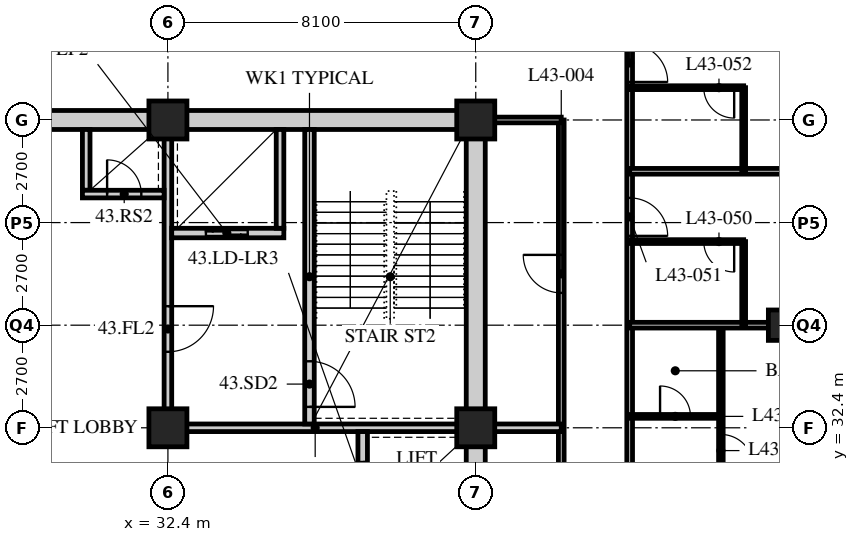
"""IFC4 building model, lengths in metres.
Left out: names, types, materials, properties, quantities, classifications, styles, units other than length and angle.
Written with IfcOpenShell. Run it as: python <this file> out.ifc"""

import sys

from ifc_helpers import new_model, si_unit, direction, frame, frame_2d, origin, origin_2d, place, context, subcontext, project, spatial, rectangle, hollow_rectangle, extrude, element, fill, save


model = new_model("IFC4")
c1 = context("Model", 3, precision=1e-05, world=origin(), true_north=direction((0.0, 1.0)))
c2 = subcontext(c1, "Body", "Model", "MODEL_VIEW")
j1 = project(units=[si_unit("LENGTHUNIT", "METRE"), si_unit("PLANEANGLEUNIT", "RADIAN")], contexts=[c1])
p1 = place(None, origin())
s1 = spatial("IfcSite", under=j1, at=p1, CompositionType="ELEMENT")
p2 = place(p1, origin())
s2 = spatial("IfcBuilding", under=s1, at=p2, CompositionType="ELEMENT")
p3 = place(p2, frame((0.0, 0.0, 170.4)))
s3 = spatial("IfcBuildingStorey", under=s2, at=p3, CompositionType="ELEMENT", Elevation=170.4)
for number, where, z_axis, x_axis in (
    (1, (32.4, 32.4, 0.0), (0.0, 0.0, 1.0), (1.0, 0.0, 0.0)),
    (2, (32.4, 40.5, 0.0), (0.0, 0.0, 1.0), (1.0, 0.0, 0.0)),
    (3, (40.5, 32.4, 0.0), (0.0, 0.0, 1.0), (1.0, 0.0, 0.0)),
    (4, (40.5, 40.5, 0.0), (0.0, 0.0, 1.0), (1.0, 0.0, 0.0)),
):
    element("IfcColumn", number, at=place(p3, frame(where, z_axis=z_axis, x_axis=x_axis)), inside=s3, PredefinedType="COLUMN", context=c2, shape_type="SweptSolid", body=[
        extrude(hollow_rectangle(XDim=1.0, YDim=1.0, WallThickness=0.1, at=origin_2d()), origin(), (0.0, 0.0, 1.0), 3.6),
    ])
p4 = place(p3, frame((48.6, 35.1, 0.0), z_axis=(0.0, 0.0, 1.0), x_axis=(1.0, 0.0, 0.0)))
e5 = element("IfcColumn", 5, at=p4, inside=s3, PredefinedType="COLUMN", context=c2, shape_type="SweptSolid", body=[
    extrude(hollow_rectangle(XDim=0.8, YDim=0.8, WallThickness=0.08, at=origin_2d()), origin(), (0.0, 0.0, 1.0), 3.6),
])
p5 = place(p3, frame((44.55, 18.9, 0.0), z_axis=(0.0, 0.0, 1.0), x_axis=(0.0, 1.0, 0.0)))
e6 = element("IfcWall", 6, at=p5, inside=s3, PredefinedType="PARTITIONING", context=c2, shape_type="SweptSolid", body=[
    extrude(rectangle(XDim=24.3, YDim=0.15, at=frame_2d((12.15, 0.0))), origin(), (0.0, 0.0, 1.0), 3.39),
])
p6 = place(p5, frame((2.35, 0.0, 0.0)))
e7 = element("IfcOpeningElement", 7, at=p6, cuts=e6, PredefinedType="OPENING", context=c2, shape_type="SweptSolid", body=[
    extrude(rectangle(XDim=1.0, YDim=2.1, at=frame_2d((0.5, 1.05))), frame((0.0, 0.085, 0.0), z_axis=(0.0, -1.0, 0.0), x_axis=(1.0, 0.0, 0.0)), (0.0, 0.0, 1.0), 0.17),
])
p7 = place(p5, frame((4.45, 0.0, 0.0)))
e8 = element("IfcOpeningElement", 8, at=p7, cuts=e6, PredefinedType="OPENING", context=c2, shape_type="SweptSolid", body=[
    extrude(rectangle(XDim=1.0, YDim=2.1, at=frame_2d((0.5, 1.05))), frame((0.0, 0.085, 0.0), z_axis=(0.0, -1.0, 0.0), x_axis=(1.0, 0.0, 0.0)), (0.0, 0.0, 1.0), 0.17),
])
p8 = place(p5, frame((18.55, 0.0, 0.0)))
e9 = element("IfcOpeningElement", 9, at=p8, cuts=e6, PredefinedType="OPENING", context=c2, shape_type="SweptSolid", body=[
    extrude(rectangle(XDim=1.0, YDim=2.1, at=frame_2d((0.5, 1.05))), frame((0.0, 0.085, 0.0), z_axis=(0.0, -1.0, 0.0), x_axis=(1.0, 0.0, 0.0)), (0.0, 0.0, 1.0), 0.17),
])
p9 = place(p5, frame((22.6, 0.0, 0.0)))
e10 = element("IfcOpeningElement", 10, at=p9, cuts=e6, PredefinedType="OPENING", context=c2, shape_type="SweptSolid", body=[
    extrude(rectangle(XDim=1.0, YDim=2.1, at=frame_2d((0.5, 1.05))), frame((0.0, 0.085, 0.0), z_axis=(0.0, -1.0, 0.0), x_axis=(1.0, 0.0, 0.0)), (0.0, 0.0, 1.0), 0.17),
])
p10 = place(p3, frame((42.75, 20.7, 0.0), z_axis=(0.0, 0.0, 1.0), x_axis=(0.0, 1.0, 0.0)))
e11 = element("IfcWall", 11, at=p10, inside=s3, PredefinedType="PARTITIONING", context=c2, shape_type="SweptSolid", body=[
    extrude(rectangle(XDim=19.8, YDim=0.15, at=frame_2d((9.9, 0.0))), origin(), (0.0, 0.0, 1.0), 3.39),
])
p11 = place(p10, frame((7.15, 0.0, 0.0)))
e12 = element("IfcOpeningElement", 12, at=p11, cuts=e11, PredefinedType="OPENING", context=c2, shape_type="SweptSolid", body=[
    extrude(rectangle(XDim=1.0, YDim=2.1, at=frame_2d((0.5, 1.05))), frame((0.0, 0.085, 0.0), z_axis=(0.0, -1.0, 0.0), x_axis=(1.0, 0.0, 0.0)), (0.0, 0.0, 1.0), 0.17),
])
p12 = place(p10, frame((15.25, 0.0, 0.0)))
e13 = element("IfcOpeningElement", 13, at=p12, cuts=e11, PredefinedType="OPENING", context=c2, shape_type="SweptSolid", body=[
    extrude(rectangle(XDim=1.0, YDim=2.1, at=frame_2d((0.5, 1.05))), frame((0.0, 0.085, 0.0), z_axis=(0.0, -1.0, 0.0), x_axis=(1.0, 0.0, 0.0)), (0.0, 0.0, 1.0), 0.17),
])
p13 = place(p3, frame((42.75, 40.5, 0.0), z_axis=(0.0, 0.0, 1.0), x_axis=(-1.0, 0.0, 0.0)))
e14 = element("IfcWall", 14, at=p13, inside=s3, PredefinedType="PARTITIONING", context=c2, shape_type="SweptSolid", body=[
    extrude(rectangle(XDim=2.05, YDim=0.15, at=frame_2d((1.025, 0.0))), origin(), (0.0, 0.0, 1.0), 3.39),
])
p14 = place(p3, frame((40.5, 32.4, 0.0), z_axis=(0.0, 0.0, 1.0), x_axis=(1.0, 0.0, 0.0)))
e15 = element("IfcWall", 15, at=p14, inside=s3, PredefinedType="SOLIDWALL", context=c2, shape_type="SweptSolid", body=[
    extrude(rectangle(XDim=2.25, YDim=0.2, at=frame_2d((1.125, 0.0))), origin(), (0.0, 0.0, 1.0), 3.39),
])
p15 = place(p3, frame((46.95, 22.95, 0.0), z_axis=(0.0, 0.0, 1.0), x_axis=(0.0, 1.0, 0.0)))
e16 = element("IfcWall", 16, at=p15, inside=s3, PredefinedType="PARTITIONING", context=c2, shape_type="SweptSolid", body=[
    extrude(rectangle(XDim=12.15, YDim=0.12, at=frame_2d((6.075, 0.0))), origin(), (0.0, 0.0, 1.0), 3.39),
])
p16 = place(p15, frame((0.975, 0.0, 0.0)))
e17 = element("IfcOpeningElement", 17, at=p16, cuts=e16, PredefinedType="OPENING", context=c2, shape_type="SweptSolid", body=[
    extrude(rectangle(XDim=0.85, YDim=2.1, at=frame_2d((0.425, 1.05))), frame((0.0, 0.07, 0.0), z_axis=(0.0, -1.0, 0.0), x_axis=(1.0, 0.0, 0.0)), (0.0, 0.0, 1.0), 0.14),
])
p17 = place(p15, frame((8.425, 0.0, 0.0)))
e18 = element("IfcOpeningElement", 18, at=p17, cuts=e16, PredefinedType="OPENING", context=c2, shape_type="SweptSolid", body=[
    extrude(rectangle(XDim=0.85, YDim=2.1, at=frame_2d((0.425, 1.05))), frame((0.0, 0.07, 0.0), z_axis=(0.0, -1.0, 0.0), x_axis=(1.0, 0.0, 0.0)), (0.0, 0.0, 1.0), 0.14),
])
p18 = place(p3, frame((44.55, 32.7, 0.0), z_axis=(0.0, 0.0, 1.0), x_axis=(1.0, 0.0, 0.0)))
e19 = element("IfcWall", 19, at=p18, inside=s3, PredefinedType="PARTITIONING", context=c2, shape_type="SweptSolid", body=[
    extrude(rectangle(XDim=2.4, YDim=0.1, at=frame_2d((1.2, 0.0))), origin(), (0.0, 0.0, 1.0), 3.39),
])
p19 = place(p18, frame((0.8, 0.0, 0.0)))
e20 = element("IfcOpeningElement", 20, at=p19, cuts=e19, PredefinedType="OPENING", context=c2, shape_type="SweptSolid", body=[
    extrude(rectangle(XDim=0.8, YDim=2.1, at=frame_2d((0.4, 1.05))), frame((0.0, 0.06, 0.0), z_axis=(0.0, -1.0, 0.0), x_axis=(1.0, 0.0, 0.0)), (0.0, 0.0, 1.0), 0.12),
])
p20 = place(p3, frame((44.55, 35.1, 0.0), z_axis=(0.0, 0.0, 1.0), x_axis=(1.0, 0.0, 0.0)))
e21 = element("IfcWall", 21, at=p20, inside=s3, PredefinedType="PARTITIONING", context=c2, shape_type="SweptSolid", body=[
    extrude(rectangle(XDim=11.85, YDim=0.15, at=frame_2d((5.925, 0.0))), origin(), (0.0, 0.0, 1.0), 2.778),
])
p21 = place(p3, frame((47.55, 35.1, 0.0), z_axis=(0.0, 0.0, 1.0), x_axis=(0.0, 1.0, 0.0)))
e22 = element("IfcWall", 22, at=p21, inside=s3, PredefinedType="PARTITIONING", context=c2, shape_type="SweptSolid", body=[
    extrude(rectangle(XDim=2.2, YDim=0.1, at=frame_2d((1.1, 0.0))), origin(), (0.0, 0.0, 1.0), 3.39),
])
p22 = place(p3, frame((44.55, 37.3, 0.0), z_axis=(0.0, 0.0, 1.0), x_axis=(1.0, 0.0, 0.0)))
e23 = element("IfcWall", 23, at=p22, inside=s3, PredefinedType="PARTITIONING", context=c2, shape_type="SweptSolid", body=[
    extrude(rectangle(XDim=3.0, YDim=0.1, at=frame_2d((1.5, 0.0))), origin(), (0.0, 0.0, 1.0), 3.39),
])
p23 = place(p22, frame((1.95, 0.0, 0.0)))
e24 = element("IfcOpeningElement", 24, at=p23, cuts=e23, PredefinedType="OPENING", context=c2, shape_type="SweptSolid", body=[
    extrude(rectangle(XDim=0.8, YDim=2.1, at=frame_2d((0.4, 1.05))), frame((0.0, 0.06, 0.0), z_axis=(0.0, -1.0, 0.0), x_axis=(1.0, 0.0, 0.0)), (0.0, 0.0, 1.0), 0.12),
])
p24 = place(p3, frame((44.55, 39.15, 0.0), z_axis=(0.0, 0.0, 1.0), x_axis=(1.0, 0.0, 0.0)))
e25 = element("IfcWall", 25, at=p24, inside=s3, PredefinedType="PARTITIONING", context=c2, shape_type="SweptSolid", body=[
    extrude(rectangle(XDim=11.85, YDim=0.15, at=frame_2d((5.925, 0.0))), origin(), (0.0, 0.0, 1.0), 3.39),
])
p25 = place(p3, frame((47.55, 39.15, 0.0), z_axis=(0.0, 0.0, 1.0), x_axis=(0.0, 1.0, 0.0)))
e26 = element("IfcWall", 26, at=p25, inside=s3, PredefinedType="PARTITIONING", context=c2, shape_type="SweptSolid", body=[
    extrude(rectangle(XDim=2.2, YDim=0.1, at=frame_2d((1.1, 0.0))), origin(), (0.0, 0.0, 1.0), 3.39),
])
p26 = place(p3, frame((44.55, 41.35, 0.0), z_axis=(0.0, 0.0, 1.0), x_axis=(1.0, 0.0, 0.0)))
e27 = element("IfcWall", 27, at=p26, inside=s3, PredefinedType="PARTITIONING", context=c2, shape_type="SweptSolid", body=[
    extrude(rectangle(XDim=3.0, YDim=0.1, at=frame_2d((1.5, 0.0))), origin(), (0.0, 0.0, 1.0), 3.39),
])
p27 = place(p26, frame((1.95, 0.0, 0.0)))
e28 = element("IfcOpeningElement", 28, at=p27, cuts=e27, PredefinedType="OPENING", context=c2, shape_type="SweptSolid", body=[
    extrude(rectangle(XDim=0.8, YDim=2.1, at=frame_2d((0.4, 1.05))), frame((0.0, 0.06, 0.0), z_axis=(0.0, -1.0, 0.0), x_axis=(1.0, 0.0, 0.0)), (0.0, 0.0, 1.0), 0.12),
])
p28 = place(p3, frame((15.95, 40.5, 0.0), z_axis=(0.0, 0.0, 1.0), x_axis=(1.0, 0.0, 0.0)))
e29 = element("IfcWall", 29, at=p28, inside=s3, PredefinedType="SOLIDWALL", context=c2, shape_type="SweptSolid", body=[
    extrude(rectangle(XDim=24.8, YDim=0.5, at=frame_2d((12.4, 0.0))), origin(), (0.0, 0.0, 1.0), 2.74),
])
p29 = place(p28, frame((11.5, 0.0, 0.0)))
e30 = element("IfcOpeningElement", 30, at=p29, cuts=e29, PredefinedType="OPENING", context=c2, shape_type="SweptSolid", body=[
    extrude(rectangle(XDim=1.8, YDim=2.4, at=frame_2d((0.9, 1.2))), frame((0.0, 0.26, 0.0), z_axis=(0.0, -1.0, 0.0), x_axis=(1.0, 0.0, 0.0)), (0.0, 0.0, 1.0), 0.52),
])
p30 = place(p3, frame((40.5, 24.55, 0.0), z_axis=(0.0, 0.0, 1.0), x_axis=(0.0, 1.0, 0.0)))
e31 = element("IfcWall", 31, at=p30, inside=s3, PredefinedType="SOLIDWALL", context=c2, shape_type="SweptSolid", body=[
    extrude(rectangle(XDim=15.7, YDim=0.5, at=frame_2d((7.85, 0.0))), origin(), (0.0, 0.0, 1.0), 2.778),
])
p31 = place(p3, frame((32.3, 32.4, 0.0), z_axis=(0.0, 0.0, 1.0), x_axis=(1.0, 0.0, 0.0)))
e32 = element("IfcWall", 32, at=p31, inside=s3, PredefinedType="SOLIDWALL", context=c2, shape_type="SweptSolid", body=[
    extrude(rectangle(XDim=7.95, YDim=0.2, at=frame_2d((3.975, 0.0))), origin(), (0.0, 0.0, 1.0), 2.778),
])
p32 = place(p3, frame((32.4, 32.5, 0.0), z_axis=(0.0, 0.0, 1.0), x_axis=(0.0, 1.0, 0.0)))
e33 = element("IfcWall", 33, at=p32, inside=s3, PredefinedType="SOLIDWALL", context=c2, shape_type="SweptSolid", body=[
    extrude(rectangle(XDim=7.75, YDim=0.2, at=frame_2d((3.875, 0.0))), origin(), (0.0, 0.0, 1.0), 2.778),
])
p33 = place(p32, frame((1.9, 0.0, 0.0)))
e34 = element("IfcOpeningElement", 34, at=p33, cuts=e33, PredefinedType="OPENING", context=c2, shape_type="SweptSolid", body=[
    extrude(rectangle(XDim=1.2, YDim=2.1, at=frame_2d((0.6, 1.05))), frame((0.0, 0.11, 0.0), z_axis=(0.0, -1.0, 0.0), x_axis=(1.0, 0.0, 0.0)), (0.0, 0.0, 1.0), 0.22),
])
p34 = place(p3, frame((37.525, 24.55, 0.0), z_axis=(0.0, 0.0, 1.0), x_axis=(0.0, 1.0, 0.0)))
e35 = element("IfcWall", 35, at=p34, inside=s3, PredefinedType="SOLIDWALL", context=c2, shape_type="SweptSolid", body=[
    extrude(rectangle(XDim=7.75, YDim=0.25, at=frame_2d((3.875, 0.0))), origin(), (0.0, 0.0, 1.0), 3.39),
])
p35 = place(p34, frame((0.65, 0.0, 0.0)))
e36 = element("IfcOpeningElement", 36, at=p35, cuts=e35, PredefinedType="OPENING", context=c2, shape_type="SweptSolid", body=[
    extrude(rectangle(XDim=1.1, YDim=2.4, at=frame_2d((0.55, 1.2))), frame((0.0, 0.135, 0.0), z_axis=(0.0, -1.0, 0.0), x_axis=(1.0, 0.0, 0.0)), (0.0, 0.0, 1.0), 0.27),
])
p36 = place(p34, frame((3.25, 0.0, 0.0)))
e37 = element("IfcOpeningElement", 37, at=p36, cuts=e35, PredefinedType="OPENING", context=c2, shape_type="SweptSolid", body=[
    extrude(rectangle(XDim=1.1, YDim=2.4, at=frame_2d((0.55, 1.2))), frame((0.0, 0.135, 0.0), z_axis=(0.0, -1.0, 0.0), x_axis=(1.0, 0.0, 0.0)), (0.0, 0.0, 1.0), 0.27),
])
p37 = place(p34, frame((5.85, 0.0, 0.0)))
e38 = element("IfcOpeningElement", 38, at=p37, cuts=e35, PredefinedType="OPENING", context=c2, shape_type="SweptSolid", body=[
    extrude(rectangle(XDim=1.1, YDim=2.4, at=frame_2d((0.55, 1.2))), frame((0.0, 0.135, 0.0), z_axis=(0.0, -1.0, 0.0), x_axis=(1.0, 0.0, 0.0)), (0.0, 0.0, 1.0), 0.27),
])
p38 = place(p3, frame((36.125, 32.5, 0.0), z_axis=(0.0, 0.0, 1.0), x_axis=(0.0, 1.0, 0.0)))
e39 = element("IfcWall", 39, at=p38, inside=s3, PredefinedType="SOLIDWALL", context=c2, shape_type="SweptSolid", body=[
    extrude(rectangle(XDim=7.75, YDim=0.25, at=frame_2d((3.875, 0.0))), origin(), (0.0, 0.0, 1.0), 3.39),
])
p39 = place(p38, frame((0.45, 0.0, 0.0)))
e40 = element("IfcOpeningElement", 40, at=p39, cuts=e39, PredefinedType="OPENING", context=c2, shape_type="SweptSolid", body=[
    extrude(rectangle(XDim=1.2, YDim=2.1, at=frame_2d((0.6, 1.05))), frame((0.0, 0.135, 0.0), z_axis=(0.0, -1.0, 0.0), x_axis=(1.0, 0.0, 0.0)), (0.0, 0.0, 1.0), 0.27),
])
p40 = place(p3, frame((32.5, 37.525, 0.0), z_axis=(0.0, 0.0, 1.0), x_axis=(1.0, 0.0, 0.0)))
e41 = element("IfcWall", 41, at=p40, inside=s3, PredefinedType="SOLIDWALL", context=c2, shape_type="SweptSolid", body=[
    extrude(rectangle(XDim=2.95, YDim=0.25, at=frame_2d((1.475, 0.0))), origin(), (0.0, 0.0, 1.0), 3.39),
])
p41 = place(p40, frame((0.9, 0.0, 0.0)))
e42 = element("IfcOpeningElement", 42, at=p41, cuts=e41, PredefinedType="OPENING", context=c2, shape_type="SweptSolid", body=[
    extrude(rectangle(XDim=1.1, YDim=2.4, at=frame_2d((0.55, 1.2))), frame((0.0, 0.135, 0.0), z_axis=(0.0, -1.0, 0.0), x_axis=(1.0, 0.0, 0.0)), (0.0, 0.0, 1.0), 0.27),
])
p42 = place(p3, frame((35.35, 37.65, 0.0), z_axis=(0.0, 0.0, 1.0), x_axis=(0.0, 1.0, 0.0)))
e43 = element("IfcWall", 43, at=p42, inside=s3, PredefinedType="SOLIDWALL", context=c2, shape_type="SweptSolid", body=[
    extrude(rectangle(XDim=2.6, YDim=0.2, at=frame_2d((1.3, 0.0))), origin(), (0.0, 0.0, 1.0), 3.39),
])
p43 = place(p3, frame((30.25, 38.65, 0.0), z_axis=(0.0, 0.0, 1.0), x_axis=(0.0, 1.0, 0.0)))
e44 = element("IfcWall", 44, at=p43, inside=s3, PredefinedType="SOLIDWALL", context=c2, shape_type="SweptSolid", body=[
    extrude(rectangle(XDim=1.6, YDim=0.2, at=frame_2d((0.8, 0.0))), origin(), (0.0, 0.0, 1.0), 3.39),
])
p44 = place(p3, frame((30.15, 38.55, 0.0), z_axis=(0.0, 0.0, 1.0), x_axis=(1.0, 0.0, 0.0)))
e45 = element("IfcWall", 45, at=p44, inside=s3, PredefinedType="SOLIDWALL", context=c2, shape_type="SweptSolid", body=[
    extrude(rectangle(XDim=2.15, YDim=0.2, at=frame_2d((1.075, 0.0))), origin(), (0.0, 0.0, 1.0), 3.39),
])
p45 = place(p44, frame((0.65, 0.0, 0.0)))
e46 = element("IfcOpeningElement", 46, at=p45, cuts=e45, PredefinedType="OPENING", context=c2, shape_type="SweptSolid", body=[
    extrude(rectangle(XDim=0.9, YDim=2.1, at=frame_2d((0.45, 1.05))), frame((0.0, 0.11, 0.0), z_axis=(0.0, -1.0, 0.0), x_axis=(1.0, 0.0, 0.0)), (0.0, 0.0, 1.0), 0.22),
])
p46 = place(p12, origin())
e47 = element("IfcDoor", 47, at=p46, inside=s3, OperationType="SINGLE_SWING_RIGHT", PredefinedType="DOOR", context=c2, shape_type="SweptSolid", body=[
    extrude(rectangle(XDim=1.0, YDim=2.1, at=frame_2d((0.5, 1.05))), frame((0.0, 0.025, 0.0), z_axis=(0.0, -1.0, 0.0), x_axis=(1.0, 0.0, 0.0)), (0.0, 0.0, 1.0), 0.05),
])
fill(e13, e47)
p47 = place(p19, origin())
e48 = element("IfcDoor", 48, at=p47, inside=s3, OperationType="SINGLE_SWING_LEFT", PredefinedType="DOOR", context=c2, shape_type="SweptSolid", body=[
    extrude(rectangle(XDim=0.8, YDim=2.1, at=frame_2d((0.4, 1.05))), frame((0.0, 0.025, 0.0), z_axis=(0.0, -1.0, 0.0), x_axis=(1.0, 0.0, 0.0)), (0.0, 0.0, 1.0), 0.05),
])
fill(e20, e48)
p48 = place(p17, origin())
e49 = element("IfcDoor", 49, at=p48, inside=s3, OperationType="SINGLE_SWING_RIGHT", PredefinedType="DOOR", context=c2, shape_type="SweptSolid", body=[
    extrude(rectangle(XDim=0.85, YDim=2.1, at=frame_2d((0.425, 1.05))), frame((0.0, 0.025, 0.0), z_axis=(0.0, -1.0, 0.0), x_axis=(1.0, 0.0, 0.0)), (0.0, 0.0, 1.0), 0.05),
])
fill(e18, e49)
p49 = place(p23, origin())
e50 = element("IfcDoor", 50, at=p49, inside=s3, OperationType="SINGLE_SWING_LEFT", PredefinedType="DOOR", context=c2, shape_type="SweptSolid", body=[
    extrude(rectangle(XDim=0.8, YDim=2.1, at=frame_2d((0.4, 1.05))), frame((0.0, 0.025, 0.0), z_axis=(0.0, -1.0, 0.0), x_axis=(1.0, 0.0, 0.0)), (0.0, 0.0, 1.0), 0.05),
])
fill(e24, e50)
p50 = place(p8, origin())
e51 = element("IfcDoor", 51, at=p50, inside=s3, OperationType="SINGLE_SWING_RIGHT", PredefinedType="DOOR", context=c2, shape_type="SweptSolid", body=[
    extrude(rectangle(XDim=1.0, YDim=2.1, at=frame_2d((0.5, 1.05))), frame((0.0, 0.025, 0.0), z_axis=(0.0, -1.0, 0.0), x_axis=(1.0, 0.0, 0.0)), (0.0, 0.0, 1.0), 0.05),
])
fill(e9, e51)
p51 = place(p27, origin())
e52 = element("IfcDoor", 52, at=p51, inside=s3, OperationType="SINGLE_SWING_LEFT", PredefinedType="DOOR", context=c2, shape_type="SweptSolid", body=[
    extrude(rectangle(XDim=0.8, YDim=2.1, at=frame_2d((0.4, 1.05))), frame((0.0, 0.025, 0.0), z_axis=(0.0, -1.0, 0.0), x_axis=(1.0, 0.0, 0.0)), (0.0, 0.0, 1.0), 0.05),
])
fill(e28, e52)
p52 = place(p9, origin())
e53 = element("IfcDoor", 53, at=p52, inside=s3, OperationType="SINGLE_SWING_RIGHT", PredefinedType="DOOR", context=c2, shape_type="SweptSolid", body=[
    extrude(rectangle(XDim=1.0, YDim=2.1, at=frame_2d((0.5, 1.05))), frame((0.0, 0.025, 0.0), z_axis=(0.0, -1.0, 0.0), x_axis=(1.0, 0.0, 0.0)), (0.0, 0.0, 1.0), 0.05),
])
fill(e10, e53)
p53 = place(p39, origin())
e54 = element("IfcDoor", 54, at=p53, inside=s3, OperationType="SINGLE_SWING_RIGHT", PredefinedType="DOOR", context=c2, shape_type="SweptSolid", body=[
    extrude(rectangle(XDim=1.2, YDim=2.1, at=frame_2d((0.6, 1.05))), frame((0.0, 0.025, 0.0), z_axis=(0.0, -1.0, 0.0), x_axis=(1.0, 0.0, 0.0)), (0.0, 0.0, 1.0), 0.05),
])
fill(e40, e54)
p54 = place(p33, origin())
e55 = element("IfcDoor", 55, at=p54, inside=s3, OperationType="SINGLE_SWING_LEFT", PredefinedType="DOOR", context=c2, shape_type="SweptSolid", body=[
    extrude(rectangle(XDim=1.2, YDim=2.1, at=frame_2d((0.6, 1.05))), frame((0.0, 0.025, 0.0), z_axis=(0.0, -1.0, 0.0), x_axis=(1.0, 0.0, 0.0)), (0.0, 0.0, 1.0), 0.05),
])
fill(e34, e55)
p55 = place(p45, origin())
e56 = element("IfcDoor", 56, at=p55, inside=s3, OperationType="SINGLE_SWING_LEFT", PredefinedType="DOOR", context=c2, shape_type="SweptSolid", body=[
    extrude(rectangle(XDim=0.9, YDim=2.1, at=frame_2d((0.45, 1.05))), frame((0.0, 0.025, 0.0), z_axis=(0.0, -1.0, 0.0), x_axis=(1.0, 0.0, 0.0)), (0.0, 0.0, 1.0), 0.05),
])
fill(e46, e56)
p56 = place(p37, origin())
e57 = element("IfcDoor", 57, at=p56, inside=s3, OperationType="DOUBLE_DOOR_SLIDING", PredefinedType="DOOR", context=c2, shape_type="SweptSolid", body=[
    extrude(rectangle(XDim=1.1, YDim=2.4, at=frame_2d((0.55, 1.2))), frame((0.0, 0.025, 0.0), z_axis=(0.0, -1.0, 0.0), x_axis=(1.0, 0.0, 0.0)), (0.0, 0.0, 1.0), 0.05),
])
fill(e38, e57)
p57 = place(p41, origin())
e58 = element("IfcDoor", 58, at=p57, inside=s3, OperationType="DOUBLE_DOOR_SLIDING", PredefinedType="DOOR", context=c2, shape_type="SweptSolid", body=[
    extrude(rectangle(XDim=1.1, YDim=2.4, at=frame_2d((0.55, 1.2))), frame((0.0, 0.025, 0.0), z_axis=(0.0, -1.0, 0.0), x_axis=(1.0, 0.0, 0.0)), (0.0, 0.0, 1.0), 0.05),
])
fill(e42, e58)
save(model, sys.argv[1])
